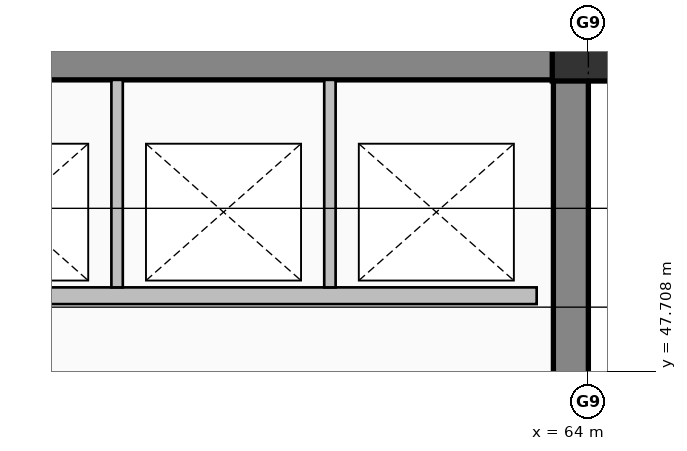
"""IFC4 building model, lengths in metres.
Left out: names, types, materials, properties, quantities, classifications, styles, units other than length and angle.
Written with IfcOpenShell. Run it as: python <this file> out.ifc"""

import sys

from ifc_helpers import new_model, si_unit, direction, frame, frame_2d, origin, origin_2d, place, context, subcontext, project, spatial, rectangle, hollow_rectangle, extrude, element, save


model = new_model("IFC4")
c1 = context("Model", 3, precision=1e-05, world=origin(), true_north=direction((0.0, 1.0)))
c2 = subcontext(c1, "Body", "Model", "MODEL_VIEW")
j1 = project(units=[si_unit("LENGTHUNIT", "METRE"), si_unit("PLANEANGLEUNIT", "RADIAN")], contexts=[c1])
p1 = place(None, origin())
s1 = spatial("IfcSite", under=j1, at=p1, CompositionType="ELEMENT")
p2 = place(p1, origin())
s2 = spatial("IfcBuilding", under=s1, at=p2, CompositionType="ELEMENT")
p3 = place(p2, frame((0.0, 0.0, 261.8)))
s3 = spatial("IfcBuildingStorey", under=s2, at=p3, CompositionType="ELEMENT", Elevation=261.8)
p4 = place(p3, frame((40.5, 51.77, 0.0), z_axis=(0.0, 0.0, 1.0), x_axis=(1.0, 0.0, 0.0)))
e1 = element("IfcWall", 1, at=p4, inside=s3, PredefinedType="SHEAR", context=c2, shape_type="SweptSolid", body=[
    extrude(rectangle(XDim=23.5, YDim=0.46, at=frame_2d((11.75, 0.0))), origin(), (0.0, 0.0, 1.0), 3.775),
])
p5 = place(p3, frame((63.77, 36.32, 0.0), z_axis=(0.0, 0.0, 1.0), x_axis=(0.0, 1.0, 0.0)))
e2 = element("IfcWall", 2, at=p5, inside=s3, PredefinedType="SHEAR", context=c2, shape_type="SweptSolid", body=[
    extrude(rectangle(XDim=15.22, YDim=0.46, at=frame_2d((7.61, 0.0))), origin(), (0.0, 0.0, 1.0), 3.775),
])
p6 = place(p3, frame((64.0, 52.0, 0.0), z_axis=(0.0, 0.0, 1.0), x_axis=(1.0, 0.0, 0.0)))
e3 = element("IfcColumn", 3, at=p6, inside=s3, PredefinedType="COLUMN", context=c2, shape_type="SweptSolid", body=[
    extrude(hollow_rectangle(XDim=0.95, YDim=0.95, WallThickness=0.036, at=origin_2d()), origin(), (0.0, 0.0, 1.0), 4.0),
])
p7 = place(p3, frame((63.32, 48.7, 0.0), z_axis=(0.0, 0.0, 1.0), x_axis=(-1.0, 0.0, 0.0)))
e4 = element("IfcWall", 4, at=p7, inside=s3, PredefinedType="PARTITIONING", context=c2, shape_type="SweptSolid", body=[
    extrude(rectangle(XDim=8.24, YDim=0.22, at=frame_2d((4.12, 0.0))), origin(), (0.0, 0.0, 1.0), 3.775),
])
for number, where, z_axis, x_axis in (
    (5, (57.8, 48.81, 0.0), (0.0, 0.0, 1.0), (0.0, 1.0, 0.0)),
    (6, (60.6, 48.81, 0.0), (0.0, 0.0, 1.0), (0.0, 1.0, 0.0)),
):
    element("IfcWall", number, at=place(p3, frame(where, z_axis=z_axis, x_axis=x_axis)), inside=s3, PredefinedType="PARTITIONING", context=c2, shape_type="SweptSolid", body=[
        extrude(rectangle(XDim=2.73, YDim=0.15, at=frame_2d((1.365, 0.0))), origin(), (0.0, 0.0, 1.0), 3.775),
    ])
save(model, sys.argv[1])
